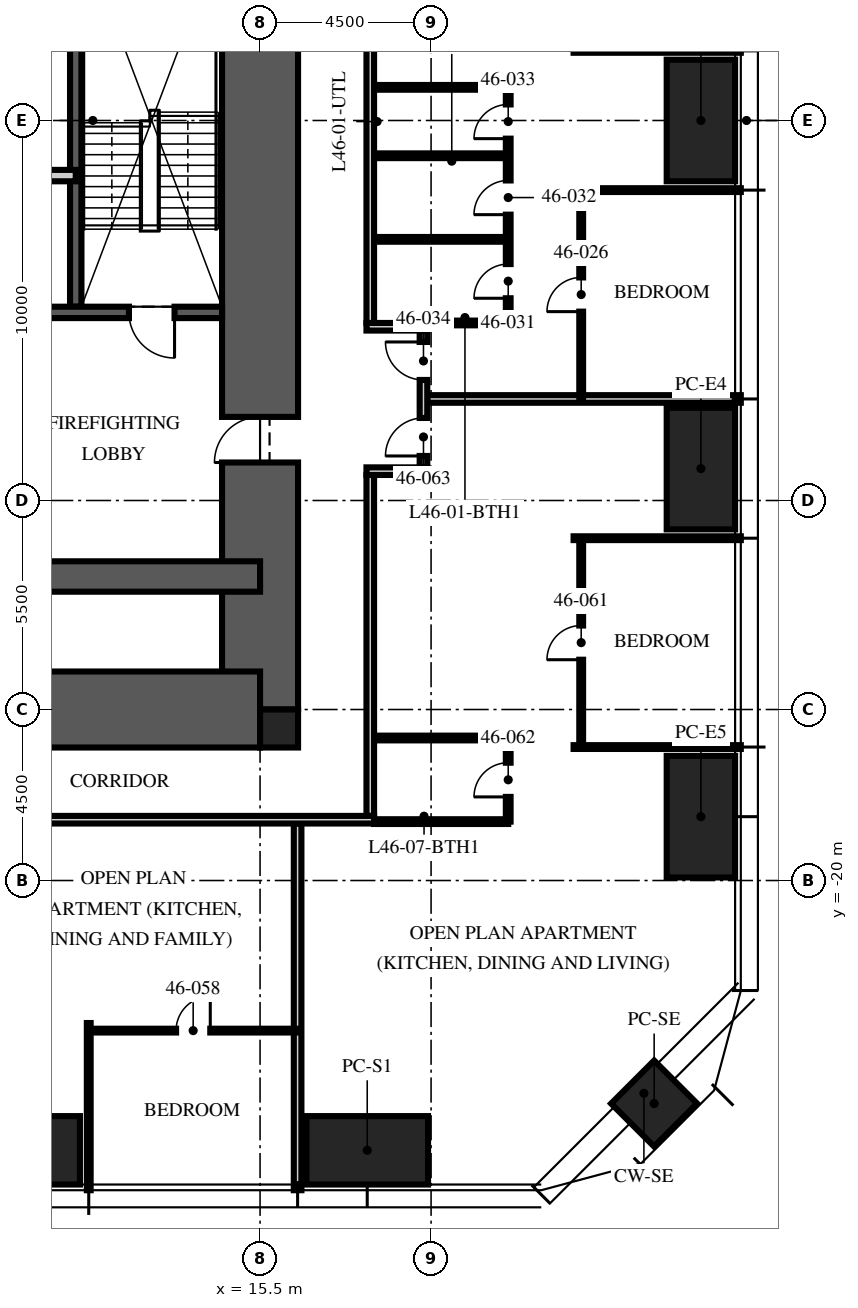
"""IFC4 building model, lengths in metres.
Left out: names, types, materials, properties, quantities, classifications, styles, units other than length and angle.
Written with IfcOpenShell. Run it as: python <this file> out.ifc"""

import sys

from ifc_helpers import new_model, si_unit, direction, frame, frame_2d, origin, origin_2d, place, context, subcontext, project, spatial, rectangle, hollow_rectangle, extrude, element, fill, save


model = new_model("IFC4")
c1 = context("Model", 3, precision=1e-05, world=origin(), true_north=direction((0.0, 1.0)))
c2 = subcontext(c1, "Body", "Model", "MODEL_VIEW")
j1 = project(units=[si_unit("LENGTHUNIT", "METRE"), si_unit("PLANEANGLEUNIT", "RADIAN")], contexts=[c1])
p1 = place(None, origin())
s1 = spatial("IfcSite", under=j1, at=p1, CompositionType="ELEMENT")
p2 = place(p1, origin())
s2 = spatial("IfcBuilding", under=s1, at=p2, CompositionType="ELEMENT")
p3 = place(p2, frame((0.0, 0.0, 182.25)))
s3 = spatial("IfcBuildingStorey", under=s2, at=p3, CompositionType="ELEMENT", Elevation=182.25)
p4 = place(p3, frame((15.5, -15.5, -0.25), z_axis=(0.0, 0.0, 1.0), x_axis=(0.0, 1.0, 0.0)))
e1 = element("IfcWall", 1, at=p4, inside=s3, PredefinedType="SHEAR", context=c2, shape_type="SweptSolid", body=[
    extrude(rectangle(XDim=31.0, YDim=2.0, at=frame_2d((15.5, 0.0))), origin(), (0.0, 0.0, 1.0), 3.7),
])
p5 = place(p4, frame((6.5, 0.0, 0.25)))
e2 = element("IfcOpeningElement", 2, at=p5, cuts=e1, PredefinedType="OPENING", context=c2, shape_type="SweptSolid", body=[
    extrude(rectangle(XDim=1.2, YDim=2.1, at=frame_2d((0.6, 1.05))), frame((0.0, 1.01, 0.0), z_axis=(0.0, -1.0, 0.0), x_axis=(1.0, 0.0, 0.0)), (0.0, 0.0, 1.0), 2.02),
])
p6 = place(p4, frame((23.0, 0.0, 0.25)))
e3 = element("IfcOpeningElement", 3, at=p6, cuts=e1, PredefinedType="OPENING", context=c2, shape_type="SweptSolid", body=[
    extrude(rectangle(XDim=1.8, YDim=2.1, at=frame_2d((0.9, 1.05))), frame((0.0, 1.01, 0.0), z_axis=(0.0, -1.0, 0.0), x_axis=(1.0, 0.0, 0.0)), (0.0, 0.0, 1.0), 2.02),
])
p7 = place(p3, frame((-15.5, -15.5, -0.25), z_axis=(0.0, 0.0, 1.0), x_axis=(1.0, 0.0, 0.0)))
e4 = element("IfcWall", 4, at=p7, inside=s3, PredefinedType="SHEAR", context=c2, shape_type="SweptSolid", body=[
    extrude(rectangle(XDim=31.0, YDim=2.0, at=frame_2d((15.5, 0.0))), origin(), (0.0, 0.0, 1.0), 3.7),
])
p8 = place(p7, frame((10.4, 0.0, 0.25)))
e5 = element("IfcOpeningElement", 5, at=p8, cuts=e4, PredefinedType="OPENING", context=c2, shape_type="SweptSolid", body=[
    extrude(rectangle(XDim=1.1, YDim=2.1, at=frame_2d((0.55, 1.05))), frame((0.0, 1.01, 0.0), z_axis=(0.0, -1.0, 0.0), x_axis=(1.0, 0.0, 0.0)), (0.0, 0.0, 1.0), 2.02),
])
p9 = place(p7, frame((13.5, 0.0, 0.25)))
e6 = element("IfcOpeningElement", 6, at=p9, cuts=e4, PredefinedType="OPENING", context=c2, shape_type="SweptSolid", body=[
    extrude(rectangle(XDim=1.1, YDim=2.1, at=frame_2d((0.55, 1.05))), frame((0.0, 1.01, 0.0), z_axis=(0.0, -1.0, 0.0), x_axis=(1.0, 0.0, 0.0)), (0.0, 0.0, 1.0), 2.02),
])
p10 = place(p7, frame((16.6, 0.0, 0.25)))
e7 = element("IfcOpeningElement", 7, at=p10, cuts=e4, PredefinedType="OPENING", context=c2, shape_type="SweptSolid", body=[
    extrude(rectangle(XDim=1.1, YDim=2.1, at=frame_2d((0.55, 1.05))), frame((0.0, 1.01, 0.0), z_axis=(0.0, -1.0, 0.0), x_axis=(1.0, 0.0, 0.0)), (0.0, 0.0, 1.0), 2.02),
])
p11 = place(p3, frame((-15.5, -12.0, -0.25), z_axis=(0.0, 0.0, 1.0), x_axis=(1.0, 0.0, 0.0)))
e8 = element("IfcWall", 8, at=p11, inside=s3, PredefinedType="SHEAR", context=c2, shape_type="SweptSolid", body=[
    extrude(rectangle(XDim=31.0, YDim=0.8, at=frame_2d((15.5, 0.0))), origin(), (0.0, 0.0, 1.0), 3.7),
])
p12 = place(p3, frame((16.0, -16.0, -0.25), z_axis=(0.0, 0.0, 1.0), x_axis=(1.0, 0.0, 0.0)))
e9 = element("IfcColumn", 9, at=p12, inside=s3, PredefinedType="COLUMN", context=c2, shape_type="SweptSolid", body=[
    extrude(rectangle(XDim=1.0, YDim=1.0, at=origin_2d()), origin(), (0.0, 0.0, 1.0), 3.7),
])
for number, where, z_axis, x_axis in (
    (10, (27.1, 0.0, 0.0), (0.0, 0.0, 1.0), (0.0, 1.0, 0.0)),
    (11, (27.1, -9.16, 0.0), (0.0, 0.0, 1.0), (0.0, 1.0, 0.0)),
    (12, (27.1, -18.32, 0.0), (0.0, 0.0, 1.0), (0.0, 1.0, 0.0)),
    (13, (18.32, -27.1, 0.0), (0.0, 0.0, 1.0), (1.0, 0.0, 0.0)),
    (14, (9.16, -27.1, 0.0), (0.0, 0.0, 1.0), (1.0, 0.0, 0.0)),
):
    element("IfcColumn", number, at=place(p3, frame(where, z_axis=z_axis, x_axis=x_axis)), inside=s3, PredefinedType="COLUMN", context=c2, shape_type="SweptSolid", body=[
        extrude(hollow_rectangle(XDim=3.2, YDim=1.8, WallThickness=0.2, at=origin_2d()), origin(), (0.0, 0.0, 1.0), 3.75),
    ])
p13 = place(p3, frame((25.87, -25.87, 0.0), z_axis=(0.0, 0.0, 1.0), x_axis=(0.707106781187, 0.707106781187, 0.0)))
e15 = element("IfcColumn", 15, at=p13, inside=s3, PredefinedType="COLUMN", context=c2, shape_type="SweptSolid", body=[
    extrude(hollow_rectangle(XDim=1.6, YDim=1.6, WallThickness=0.1, at=origin_2d()), origin(), (0.0, 0.0, 1.0), 3.75),
])
p14 = place(p3, frame((10.65, -4.9, 0.0), z_axis=(0.0, 0.0, 1.0), x_axis=(0.0, 1.0, 0.0)))
e16 = element("IfcWall", 16, at=p14, inside=s3, PredefinedType="SOLIDWALL", context=c2, shape_type="SweptSolid", body=[
    extrude(rectangle(XDim=10.1, YDim=0.3, at=frame_2d((5.05, 0.0))), origin(), (0.0, 0.0, 1.0), 3.45),
])
p15 = place(p3, frame((14.5, -5.05, 0.0), z_axis=(0.0, 0.0, 1.0), x_axis=(-1.0, 0.0, 0.0)))
e17 = element("IfcWall", 17, at=p15, inside=s3, PredefinedType="SOLIDWALL", context=c2, shape_type="SweptSolid", body=[
    extrude(rectangle(XDim=5.7, YDim=0.3, at=frame_2d((2.85, 0.0))), origin(), (0.0, 0.0, 1.0), 3.45),
])
p16 = place(p15, frame((1.25, 0.0, 0.0)))
e18 = element("IfcOpeningElement", 18, at=p16, cuts=e17, PredefinedType="OPENING", context=c2, shape_type="SweptSolid", body=[
    extrude(rectangle(XDim=1.2, YDim=2.1, at=frame_2d((0.6, 1.05))), frame((0.0, 0.16, 0.0), z_axis=(0.0, -1.0, 0.0), x_axis=(1.0, 0.0, 0.0)), (0.0, 0.0, 1.0), 0.32),
])
p17 = place(p3, frame((10.65, -1.45, 0.0), z_axis=(0.0, 0.0, 1.0), x_axis=(-1.0, 0.0, 0.0)))
e19 = element("IfcWall", 19, at=p17, inside=s3, PredefinedType="PARTITIONING", context=c2, shape_type="SweptSolid", body=[
    extrude(rectangle(XDim=6.45, YDim=0.3, at=frame_2d((3.225, 0.0))), origin(), (0.0, 0.0, 1.0), 3.45),
])
p18 = place(p3, frame((19.9, -7.328, 0.0), z_axis=(0.0, 0.0, 1.0), x_axis=(1.0, 0.0, 0.0)))
e20 = element("IfcWall", 20, at=p18, inside=s3, PredefinedType="PARTITIONING", context=c2, shape_type="SweptSolid", body=[
    extrude(rectangle(XDim=8.25, YDim=0.2, at=frame_2d((4.125, 0.0))), origin(), (0.0, 0.0, 1.0), 2.56),
])
for number, where, z_axis, x_axis in (
    (21, (23.75, -1.832, 0.0), (0.0, 0.0, 1.0), (1.0, 0.0, 0.0)),
    (22, (23.75, 1.832, 0.0), (0.0, 0.0, 1.0), (1.0, 0.0, 0.0)),
    (23, (10.992, -23.75, 0.0), (0.0, 0.0, 1.0), (0.0, -1.0, 0.0)),
):
    element("IfcWall", number, at=place(p3, frame(where, z_axis=z_axis, x_axis=x_axis)), inside=s3, PredefinedType="PARTITIONING", context=c2, shape_type="SweptSolid", body=[
        extrude(rectangle(XDim=4.4, YDim=0.1, at=frame_2d((2.2, 0.0))), origin(), (0.0, 0.0, 1.0), 2.56),
    ])
p19 = place(p3, frame((16.488, -18.5, 0.0), z_axis=(0.0, 0.0, 1.0), x_axis=(0.0, -1.0, 0.0)))
e24 = element("IfcWall", 24, at=p19, inside=s3, PredefinedType="PARTITIONING", context=c2, shape_type="SweptSolid", body=[
    extrude(rectangle(XDim=9.65, YDim=0.2, at=frame_2d((4.825, 0.0))), origin(), (0.0, 0.0, 1.0), 2.56),
])
for number, where, z_axis, x_axis in (
    (25, (23.75, -16.488, 0.0), (0.0, 0.0, 1.0), (1.0, 0.0, 0.0)),
    (26, (23.75, -10.992, 0.0), (0.0, 0.0, 1.0), (1.0, 0.0, 0.0)),
):
    element("IfcWall", number, at=place(p3, frame(where, z_axis=z_axis, x_axis=x_axis)), inside=s3, PredefinedType="PARTITIONING", context=c2, shape_type="SweptSolid", body=[
        extrude(rectangle(XDim=4.4, YDim=0.1, at=frame_2d((2.2, 0.0))), origin(), (0.0, 0.0, 1.0), 2.56),
    ])
p20 = place(p3, frame((23.95, -7.328, 0.0), z_axis=(0.0, 0.0, 1.0), x_axis=(0.0, 1.0, 0.0)))
e27 = element("IfcWall", 27, at=p20, inside=s3, PredefinedType="PARTITIONING", context=c2, shape_type="SweptSolid", body=[
    extrude(rectangle(XDim=5.496, YDim=0.1, at=frame_2d((2.748, 0.0))), origin(), (0.0, 0.0, 1.0), 2.56),
])
p21 = place(p20, frame((2.298, 0.0, 0.0)))
e28 = element("IfcOpeningElement", 28, at=p21, cuts=e27, PredefinedType="OPENING", context=c2, shape_type="SweptSolid", body=[
    extrude(rectangle(XDim=0.9, YDim=2.1, at=frame_2d((0.45, 1.05))), frame((0.0, 0.06, 0.0), z_axis=(0.0, -1.0, 0.0), x_axis=(1.0, 0.0, 0.0)), (0.0, 0.0, 1.0), 0.12),
])
p22 = place(p3, frame((22.03, -5.328, 0.0), z_axis=(0.0, 0.0, 1.0), x_axis=(0.0, 1.0, 0.0)))
e29 = element("IfcWall", 29, at=p22, inside=s3, PredefinedType="PARTITIONING", context=c2, shape_type="SweptSolid", body=[
    extrude(rectangle(XDim=6.2, YDim=0.125, at=frame_2d((3.1, 0.0))), origin(), (0.0, 0.0, 1.0), 2.45),
])
p23 = place(p22, frame((0.65, 0.0, 0.0)))
e30 = element("IfcOpeningElement", 30, at=p23, cuts=e29, PredefinedType="OPENING", context=c2, shape_type="SweptSolid", body=[
    extrude(rectangle(XDim=0.9, YDim=2.1, at=frame_2d((0.45, 1.05))), frame((0.0, 0.073, 0.0), z_axis=(0.0, -1.0, 0.0), x_axis=(1.0, 0.0, 0.0)), (0.0, 0.0, 1.0), 0.145),
])
p24 = place(p22, frame((2.85, 0.0, 0.0)))
e31 = element("IfcOpeningElement", 31, at=p24, cuts=e29, PredefinedType="OPENING", context=c2, shape_type="SweptSolid", body=[
    extrude(rectangle(XDim=0.9, YDim=2.1, at=frame_2d((0.45, 1.05))), frame((0.0, 0.073, 0.0), z_axis=(0.0, -1.0, 0.0), x_axis=(1.0, 0.0, 0.0)), (0.0, 0.0, 1.0), 0.145),
])
p25 = place(p22, frame((4.85, 0.0, 0.0)))
e32 = element("IfcOpeningElement", 32, at=p25, cuts=e29, PredefinedType="OPENING", context=c2, shape_type="SweptSolid", body=[
    extrude(rectangle(XDim=0.9, YDim=2.1, at=frame_2d((0.45, 1.05))), frame((0.0, 0.073, 0.0), z_axis=(0.0, -1.0, 0.0), x_axis=(1.0, 0.0, 0.0)), (0.0, 0.0, 1.0), 0.145),
])
p26 = place(p3, frame((19.97, -5.328, 0.0), z_axis=(0.0, 0.0, 1.0), x_axis=(1.0, 0.0, 0.0)))
e33 = element("IfcWall", 33, at=p26, inside=s3, PredefinedType="PARTITIONING", context=c2, shape_type="SweptSolid", body=[
    extrude(rectangle(XDim=2.06, YDim=0.125, at=frame_2d((1.03, 0.0))), origin(), (0.0, 0.0, 1.0), 3.45),
])
for number, where, z_axis, x_axis in (
    (34, (18.5, -3.128, 0.0), (0.0, 0.0, 1.0), (1.0, 0.0, 0.0)),
    (35, (18.5, -0.928, 0.0), (0.0, 0.0, 1.0), (1.0, 0.0, 0.0)),
    (36, (18.5, 0.872, 0.0), (0.0, 0.0, 1.0), (1.0, 0.0, 0.0)),
):
    element("IfcWall", number, at=place(p3, frame(where, z_axis=z_axis, x_axis=x_axis)), inside=s3, PredefinedType="PARTITIONING", context=c2, shape_type="SweptSolid", body=[
        extrude(rectangle(XDim=3.53, YDim=0.125, at=frame_2d((1.765, 0.0))), origin(), (0.0, 0.0, 1.0), 3.45),
    ])
p27 = place(p3, frame((10.992, -23.95, 0.0), z_axis=(0.0, 0.0, 1.0), x_axis=(1.0, 0.0, 0.0)))
e37 = element("IfcWall", 37, at=p27, inside=s3, PredefinedType="PARTITIONING", context=c2, shape_type="SweptSolid", body=[
    extrude(rectangle(XDim=5.496, YDim=0.1, at=frame_2d((2.748, 0.0))), origin(), (0.0, 0.0, 1.0), 2.56),
])
p28 = place(p27, frame((2.298, 0.0, 0.0)))
e38 = element("IfcOpeningElement", 38, at=p28, cuts=e37, PredefinedType="OPENING", context=c2, shape_type="SweptSolid", body=[
    extrude(rectangle(XDim=0.9, YDim=2.1, at=frame_2d((0.45, 1.05))), frame((0.0, 0.06, 0.0), z_axis=(0.0, -1.0, 0.0), x_axis=(1.0, 0.0, 0.0)), (0.0, 0.0, 1.0), 0.12),
])
p29 = place(p3, frame((23.95, -16.488, 0.0), z_axis=(0.0, 0.0, 1.0), x_axis=(0.0, 1.0, 0.0)))
e39 = element("IfcWall", 39, at=p29, inside=s3, PredefinedType="PARTITIONING", context=c2, shape_type="SweptSolid", body=[
    extrude(rectangle(XDim=5.496, YDim=0.1, at=frame_2d((2.748, 0.0))), origin(), (0.0, 0.0, 1.0), 2.56),
])
p30 = place(p29, frame((2.298, 0.0, 0.0)))
e40 = element("IfcOpeningElement", 40, at=p30, cuts=e39, PredefinedType="OPENING", context=c2, shape_type="SweptSolid", body=[
    extrude(rectangle(XDim=0.9, YDim=2.1, at=frame_2d((0.45, 1.05))), frame((0.0, 0.06, 0.0), z_axis=(0.0, -1.0, 0.0), x_axis=(1.0, 0.0, 0.0)), (0.0, 0.0, 1.0), 0.12),
])
p31 = place(p3, frame((22.03, -18.45, 0.0), z_axis=(0.0, 0.0, 1.0), x_axis=(0.0, 1.0, 0.0)))
e41 = element("IfcWall", 41, at=p31, inside=s3, PredefinedType="PARTITIONING", context=c2, shape_type="SweptSolid", body=[
    extrude(rectangle(XDim=2.2, YDim=0.125, at=frame_2d((1.1, 0.0))), origin(), (0.0, 0.0, 1.0), 2.45),
])
p32 = place(p31, frame((0.65, 0.0, 0.0)))
e42 = element("IfcOpeningElement", 42, at=p32, cuts=e41, PredefinedType="OPENING", context=c2, shape_type="SweptSolid", body=[
    extrude(rectangle(XDim=0.9, YDim=2.1, at=frame_2d((0.45, 1.05))), frame((0.0, 0.073, 0.0), z_axis=(0.0, -1.0, 0.0), x_axis=(1.0, 0.0, 0.0)), (0.0, 0.0, 1.0), 0.145),
])
p33 = place(p3, frame((18.5, -18.45, 0.0), z_axis=(0.0, 0.0, 1.0), x_axis=(1.0, 0.0, 0.0)))
e43 = element("IfcWall", 43, at=p33, inside=s3, PredefinedType="PARTITIONING", context=c2, shape_type="SweptSolid", body=[
    extrude(rectangle(XDim=3.53, YDim=0.125, at=frame_2d((1.765, 0.0))), origin(), (0.0, 0.0, 1.0), 2.25),
])
p34 = place(p3, frame((18.5, -16.25, 0.0), z_axis=(0.0, 0.0, 1.0), x_axis=(1.0, 0.0, 0.0)))
e44 = element("IfcWall", 44, at=p34, inside=s3, PredefinedType="PARTITIONING", context=c2, shape_type="SweptSolid", body=[
    extrude(rectangle(XDim=3.53, YDim=0.125, at=frame_2d((1.765, 0.0))), origin(), (0.0, 0.0, 1.0), 3.45),
])
p35 = place(p3, frame((18.4, -18.3, 0.0), z_axis=(0.0, 0.0, 1.0), x_axis=(0.0, 1.0, 0.0)))
e45 = element("IfcWall", 45, at=p35, inside=s3, PredefinedType="PARTITIONING", context=c2, shape_type="SweptSolid", body=[
    extrude(rectangle(XDim=8.972, YDim=0.2, at=frame_2d((4.486, 0.0))), origin(), (0.0, 0.0, 1.0), 2.25),
])
p36 = place(p3, frame((18.3, -9.228, 0.0), z_axis=(0.0, 0.0, 1.0), x_axis=(1.0, 0.0, 0.0)))
e46 = element("IfcWall", 46, at=p36, inside=s3, PredefinedType="PARTITIONING", context=c2, shape_type="SweptSolid", body=[
    extrude(rectangle(XDim=1.6, YDim=0.2, at=frame_2d((0.8, 0.0))), origin(), (0.0, 0.0, 1.0), 2.45),
])
p37 = place(p3, frame((18.3, -5.428, 0.0), z_axis=(0.0, 0.0, 1.0), x_axis=(1.0, 0.0, 0.0)))
e47 = element("IfcWall", 47, at=p37, inside=s3, PredefinedType="PARTITIONING", context=c2, shape_type="SweptSolid", body=[
    extrude(rectangle(XDim=1.6, YDim=0.2, at=frame_2d((0.8, 0.0))), origin(), (0.0, 0.0, 1.0), 3.45),
])
p38 = place(p3, frame((19.8, -9.128, 0.0), z_axis=(0.0, 0.0, 1.0), x_axis=(0.0, 1.0, 0.0)))
e48 = element("IfcWall", 48, at=p38, inside=s3, PredefinedType="PARTITIONING", context=c2, shape_type="SweptSolid", body=[
    extrude(rectangle(XDim=3.6, YDim=0.2, at=frame_2d((1.8, 0.0))), origin(), (0.0, 0.0, 1.0), 2.45),
])
p39 = place(p38, frame((2.3, 0.0, 0.0)))
e49 = element("IfcOpeningElement", 49, at=p39, cuts=e48, PredefinedType="OPENING", context=c2, shape_type="SweptSolid", body=[
    extrude(rectangle(XDim=1.0, YDim=2.2, at=frame_2d((0.5, 1.1))), frame((0.0, 0.11, 0.0), z_axis=(0.0, -1.0, 0.0), x_axis=(1.0, 0.0, 0.0)), (0.0, 0.0, 1.0), 0.22),
])
p40 = place(p38, frame((0.3, 0.0, 0.0)))
e50 = element("IfcOpeningElement", 50, at=p40, cuts=e48, PredefinedType="OPENING", context=c2, shape_type="SweptSolid", body=[
    extrude(rectangle(XDim=1.0, YDim=2.2, at=frame_2d((0.5, 1.1))), frame((0.0, 0.11, 0.0), z_axis=(0.0, -1.0, 0.0), x_axis=(1.0, 0.0, 0.0)), (0.0, 0.0, 1.0), 0.22),
])
p41 = place(p3, frame((18.4, -5.328, 0.0), z_axis=(0.0, 0.0, 1.0), x_axis=(0.0, 1.0, 0.0)))
e51 = element("IfcWall", 51, at=p41, inside=s3, PredefinedType="PARTITIONING", context=c2, shape_type="SweptSolid", body=[
    extrude(rectangle(XDim=22.028, YDim=0.2, at=frame_2d((11.014, 0.0))), origin(), (0.0, 0.0, 1.0), 2.45),
])
p42 = place(p3, frame((18.5, -18.4, 0.0), z_axis=(0.0, 0.0, 1.0), x_axis=(-1.0, 0.0, 0.0)))
e52 = element("IfcWall", 52, at=p42, inside=s3, PredefinedType="PARTITIONING", context=c2, shape_type="SweptSolid", body=[
    extrude(rectangle(XDim=12.9, YDim=0.2, at=frame_2d((6.45, 0.0))), origin(), (0.0, 0.0, 1.0), 2.25),
])
p43 = place(p16, origin())
e53 = element("IfcDoor", 53, at=p43, inside=s3, OperationType="SINGLE_SWING_LEFT", PredefinedType="DOOR", context=c2, shape_type="SweptSolid", body=[
    extrude(rectangle(XDim=1.2, YDim=2.1, at=frame_2d((0.6, 1.05))), frame((0.0, 0.025, 0.0), z_axis=(0.0, -1.0, 0.0), x_axis=(1.0, 0.0, 0.0)), (0.0, 0.0, 1.0), 0.05),
])
fill(e18, e53)
p44 = place(p5, origin())
e54 = element("IfcDoor", 54, at=p44, inside=s3, OperationType="SINGLE_SWING_LEFT", PredefinedType="DOOR", context=c2, shape_type="SweptSolid", body=[
    extrude(rectangle(XDim=1.2, YDim=2.1, at=frame_2d((0.6, 1.05))), frame((0.0, 0.025, 0.0), z_axis=(0.0, -1.0, 0.0), x_axis=(1.0, 0.0, 0.0)), (0.0, 0.0, 1.0), 0.05),
])
fill(e2, e54)
p45 = place(p21, origin())
e55 = element("IfcDoor", 55, at=p45, inside=s3, OperationType="SINGLE_SWING_LEFT", PredefinedType="DOOR", context=c2, shape_type="SweptSolid", body=[
    extrude(rectangle(XDim=0.9, YDim=2.1, at=frame_2d((0.45, 1.05))), frame((0.0, 0.025, 0.0), z_axis=(0.0, -1.0, 0.0), x_axis=(1.0, 0.0, 0.0)), (0.0, 0.0, 1.0), 0.05),
])
fill(e28, e55)
p46 = place(p23, origin())
e56 = element("IfcDoor", 56, at=p46, inside=s3, OperationType="SINGLE_SWING_LEFT", PredefinedType="DOOR", context=c2, shape_type="SweptSolid", body=[
    extrude(rectangle(XDim=0.9, YDim=2.1, at=frame_2d((0.45, 1.05))), frame((0.0, 0.025, 0.0), z_axis=(0.0, -1.0, 0.0), x_axis=(1.0, 0.0, 0.0)), (0.0, 0.0, 1.0), 0.05),
])
fill(e30, e56)
p47 = place(p24, origin())
e57 = element("IfcDoor", 57, at=p47, inside=s3, OperationType="SINGLE_SWING_LEFT", PredefinedType="DOOR", context=c2, shape_type="SweptSolid", body=[
    extrude(rectangle(XDim=0.9, YDim=2.1, at=frame_2d((0.45, 1.05))), frame((0.0, 0.025, 0.0), z_axis=(0.0, -1.0, 0.0), x_axis=(1.0, 0.0, 0.0)), (0.0, 0.0, 1.0), 0.05),
])
fill(e31, e57)
p48 = place(p25, origin())
e58 = element("IfcDoor", 58, at=p48, inside=s3, OperationType="SINGLE_SWING_LEFT", PredefinedType="DOOR", context=c2, shape_type="SweptSolid", body=[
    extrude(rectangle(XDim=0.9, YDim=2.1, at=frame_2d((0.45, 1.05))), frame((0.0, 0.025, 0.0), z_axis=(0.0, -1.0, 0.0), x_axis=(1.0, 0.0, 0.0)), (0.0, 0.0, 1.0), 0.05),
])
fill(e32, e58)
p49 = place(p39, origin())
e59 = element("IfcDoor", 59, at=p49, inside=s3, OperationType="SINGLE_SWING_RIGHT", PredefinedType="DOOR", context=c2, shape_type="SweptSolid", body=[
    extrude(rectangle(XDim=1.0, YDim=2.2, at=frame_2d((0.5, 1.1))), frame((0.0, 0.025, 0.0), z_axis=(0.0, -1.0, 0.0), x_axis=(1.0, 0.0, 0.0)), (0.0, 0.0, 1.0), 0.05),
])
fill(e49, e59)
p50 = place(p28, origin())
e60 = element("IfcDoor", 60, at=p50, inside=s3, OperationType="SINGLE_SWING_RIGHT", PredefinedType="DOOR", context=c2, shape_type="SweptSolid", body=[
    extrude(rectangle(XDim=0.9, YDim=2.1, at=frame_2d((0.45, 1.05))), frame((0.0, 0.025, 0.0), z_axis=(0.0, -1.0, 0.0), x_axis=(1.0, 0.0, 0.0)), (0.0, 0.0, 1.0), 0.05),
])
fill(e38, e60)
p51 = place(p30, origin())
e61 = element("IfcDoor", 61, at=p51, inside=s3, OperationType="SINGLE_SWING_LEFT", PredefinedType="DOOR", context=c2, shape_type="SweptSolid", body=[
    extrude(rectangle(XDim=0.9, YDim=2.1, at=frame_2d((0.45, 1.05))), frame((0.0, 0.025, 0.0), z_axis=(0.0, -1.0, 0.0), x_axis=(1.0, 0.0, 0.0)), (0.0, 0.0, 1.0), 0.05),
])
fill(e40, e61)
p52 = place(p32, origin())
e62 = element("IfcDoor", 62, at=p52, inside=s3, OperationType="SINGLE_SWING_LEFT", PredefinedType="DOOR", context=c2, shape_type="SweptSolid", body=[
    extrude(rectangle(XDim=0.9, YDim=2.1, at=frame_2d((0.45, 1.05))), frame((0.0, 0.025, 0.0), z_axis=(0.0, -1.0, 0.0), x_axis=(1.0, 0.0, 0.0)), (0.0, 0.0, 1.0), 0.05),
])
fill(e42, e62)
p53 = place(p40, origin())
e63 = element("IfcDoor", 63, at=p53, inside=s3, OperationType="SINGLE_SWING_LEFT", PredefinedType="DOOR", context=c2, shape_type="SweptSolid", body=[
    extrude(rectangle(XDim=1.0, YDim=2.2, at=frame_2d((0.5, 1.1))), frame((0.0, 0.025, 0.0), z_axis=(0.0, -1.0, 0.0), x_axis=(1.0, 0.0, 0.0)), (0.0, 0.0, 1.0), 0.05),
])
fill(e50, e63)
save(model, sys.argv[1])
